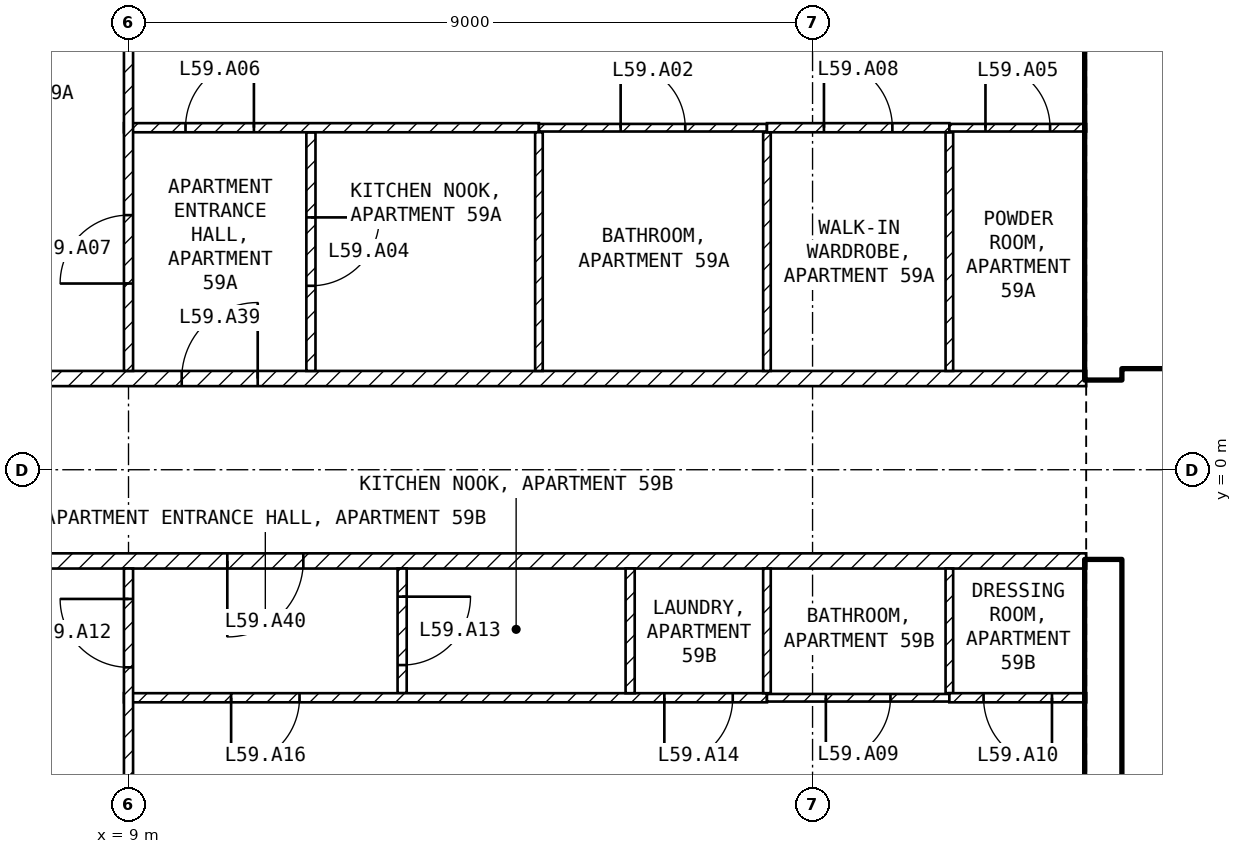
"""IFC4 building model, lengths in metres.
Left out: names, types, materials, properties, quantities, classifications, styles, units other than length and angle.
Written with IfcOpenShell. Run it as: python <this file> out.ifc"""

import sys

from ifc_helpers import new_model, si_unit, direction, frame, frame_2d, origin, place, context, subcontext, project, spatial, rectangle, extrude, element, fill, save


model = new_model("IFC4")
c1 = context("Model", 3, precision=1e-05, world=origin(), true_north=direction((0.0, 1.0)))
c2 = subcontext(c1, "Body", "Model", "MODEL_VIEW")
j1 = project(units=[si_unit("LENGTHUNIT", "METRE"), si_unit("PLANEANGLEUNIT", "RADIAN")], contexts=[c1])
p1 = place(None, origin())
s1 = spatial("IfcSite", under=j1, at=p1, CompositionType="ELEMENT")
p2 = place(p1, origin())
s2 = spatial("IfcBuilding", under=s1, at=p2, CompositionType="ELEMENT")
p3 = place(p2, frame((0.0, 0.0, 236.0)))
s3 = spatial("IfcBuildingStorey", under=s2, at=p3, CompositionType="ELEMENT", Elevation=236.0)
for number, where, z_axis, x_axis in (
    (1, (21.825, -8.1, 0.0), (0.0, 0.0, 1.0), (0.0, 1.0, 0.0)),
    (2, (21.825, 1.2, 0.0), (0.0, 0.0, 1.0), (0.0, 1.0, 0.0)),
):
    element("IfcWall", number, at=place(p3, frame(where, z_axis=z_axis, x_axis=x_axis)), inside=s3, PredefinedType="SHEAR", context=c2, shape_type="SweptSolid", body=[
        extrude(rectangle(XDim=6.9, YDim=0.45, at=frame_2d((3.45, 0.0))), origin(), (0.0, 0.0, 1.0), 3.25),
    ])
p4 = place(p3, frame((22.05, 1.45, 0.0), z_axis=(0.0, 0.0, 1.0), x_axis=(1.0, 0.0, 0.0)))
e3 = element("IfcWall", 3, at=p4, inside=s3, PredefinedType="SOLIDWALL", context=c2, shape_type="SweptSolid", body=[
    extrude(rectangle(XDim=11.3, YDim=0.2, at=frame_2d((5.65, 0.0))), origin(), (0.0, 0.0, 1.0), 3.25),
])
p5 = place(p4, frame((0.75, 0.0, 0.0)))
e4 = element("IfcOpeningElement", 4, at=p5, cuts=e3, PredefinedType="OPENING", context=c2, shape_type="SweptSolid", body=[
    extrude(rectangle(XDim=1.0, YDim=2.1, at=frame_2d((0.5, 1.05))), frame((0.0, 0.11, 0.0), z_axis=(0.0, -1.0, 0.0), x_axis=(1.0, 0.0, 0.0)), (0.0, 0.0, 1.0), 0.22),
])
p6 = place(p4, frame((3.25, 0.0, 0.0)))
e5 = element("IfcOpeningElement", 5, at=p6, cuts=e3, PredefinedType="OPENING", context=c2, shape_type="SweptSolid", body=[
    extrude(rectangle(XDim=1.0, YDim=2.1, at=frame_2d((0.5, 1.05))), frame((0.0, 0.11, 0.0), z_axis=(0.0, -1.0, 0.0), x_axis=(1.0, 0.0, 0.0)), (0.0, 0.0, 1.0), 0.22),
])
p7 = place(p4, frame((9.225, 0.0, 0.0)))
e6 = element("IfcOpeningElement", 6, at=p7, cuts=e3, PredefinedType="OPENING", context=c2, shape_type="SweptSolid", body=[
    extrude(rectangle(XDim=0.9, YDim=2.1, at=frame_2d((0.45, 1.05))), frame((0.0, 0.11, 0.0), z_axis=(0.0, -1.0, 0.0), x_axis=(1.0, 0.0, 0.0)), (0.0, 0.0, 1.0), 0.22),
])
p8 = place(p3, frame((22.05, 5.15, 0.0), z_axis=(0.0, 0.0, 1.0), x_axis=(1.0, 0.0, 0.0)))
e7 = element("IfcWall", 7, at=p8, inside=s3, PredefinedType="SOLIDWALL", context=c2, shape_type="SweptSolid", body=[
    extrude(rectangle(XDim=6.3, YDim=0.2, at=frame_2d((3.15, 0.0))), origin(), (0.0, 0.0, 1.0), 3.25),
])
p9 = place(p8, frame((0.2, 0.0, 0.0)))
e8 = element("IfcOpeningElement", 8, at=p9, cuts=e7, PredefinedType="OPENING", context=c2, shape_type="SweptSolid", body=[
    extrude(rectangle(XDim=1.0, YDim=2.1, at=frame_2d((0.5, 1.05))), frame((0.0, 0.11, 0.0), z_axis=(0.0, -1.0, 0.0), x_axis=(1.0, 0.0, 0.0)), (0.0, 0.0, 1.0), 0.22),
])
p10 = place(p3, frame((4.4, 1.2, 0.0), z_axis=(0.0, 0.0, 1.0), x_axis=(1.0, 0.0, 0.0)))
e9 = element("IfcWall", 9, at=p10, inside=s3, PredefinedType="PARTITIONING", context=c2, shape_type="SweptSolid", body=[
    extrude(rectangle(XDim=17.2, YDim=0.2, at=frame_2d((8.6, 0.0))), origin(), (0.0, 0.0, 1.0), 3.25),
])
p11 = place(p10, frame((5.3, 0.0, 0.0)))
e10 = element("IfcOpeningElement", 10, at=p11, cuts=e9, PredefinedType="OPENING", context=c2, shape_type="SweptSolid", body=[
    extrude(rectangle(XDim=1.0, YDim=2.1, at=frame_2d((0.5, 1.05))), frame((0.0, 0.11, 0.0), z_axis=(0.0, -1.0, 0.0), x_axis=(1.0, 0.0, 0.0)), (0.0, 0.0, 1.0), 0.22),
])
p12 = place(p3, frame((21.6, -1.2, 0.0), z_axis=(0.0, 0.0, 1.0), x_axis=(-1.0, 0.0, 0.0)))
e11 = element("IfcWall", 11, at=p12, inside=s3, PredefinedType="PARTITIONING", context=c2, shape_type="SweptSolid", body=[
    extrude(rectangle(XDim=17.2, YDim=0.2, at=frame_2d((8.6, 0.0))), origin(), (0.0, 0.0, 1.0), 3.25),
])
p13 = place(p12, frame((10.3, 0.0, 0.0)))
e12 = element("IfcOpeningElement", 12, at=p13, cuts=e11, PredefinedType="OPENING", context=c2, shape_type="SweptSolid", body=[
    extrude(rectangle(XDim=1.0, YDim=2.1, at=frame_2d((0.5, 1.05))), frame((0.0, 0.11, 0.0), z_axis=(0.0, -1.0, 0.0), x_axis=(1.0, 0.0, 0.0)), (0.0, 0.0, 1.0), 0.22),
])
p14 = place(p3, frame((11.4, 4.44, 0.0), z_axis=(0.0, 0.0, 1.0), x_axis=(0.0, -1.0, 0.0)))
e13 = element("IfcWall", 13, at=p14, inside=s3, PredefinedType="PARTITIONING", context=c2, shape_type="SweptSolid", body=[
    extrude(rectangle(XDim=3.14, YDim=0.12, at=frame_2d((1.57, 0.0))), origin(), (0.0, 0.0, 1.0), 3.25),
])
p15 = place(p14, frame((1.12, 0.0, 0.0)))
e14 = element("IfcOpeningElement", 14, at=p15, cuts=e13, PredefinedType="OPENING", context=c2, shape_type="SweptSolid", body=[
    extrude(rectangle(XDim=0.9, YDim=2.1, at=frame_2d((0.45, 1.05))), frame((0.0, 0.07, 0.0), z_axis=(0.0, -1.0, 0.0), x_axis=(1.0, 0.0, 0.0)), (0.0, 0.0, 1.0), 0.14),
])
p16 = place(p3, frame((8.94, 4.5, 0.0), z_axis=(0.0, 0.0, 1.0), x_axis=(1.0, 0.0, 0.0)))
e15 = element("IfcWall", 15, at=p16, inside=s3, PredefinedType="PARTITIONING", context=c2, shape_type="SweptSolid", body=[
    extrude(rectangle(XDim=5.46, YDim=0.12, at=frame_2d((2.73, 0.0))), origin(), (0.0, 0.0, 1.0), 3.25),
])
p17 = place(p16, frame((0.81, 0.0, 0.0)))
e16 = element("IfcOpeningElement", 16, at=p17, cuts=e15, PredefinedType="OPENING", context=c2, shape_type="SweptSolid", body=[
    extrude(rectangle(XDim=0.9, YDim=2.1, at=frame_2d((0.45, 1.05))), frame((0.0, 0.07, 0.0), z_axis=(0.0, -1.0, 0.0), x_axis=(1.0, 0.0, 0.0)), (0.0, 0.0, 1.0), 0.14),
])
p18 = place(p3, frame((9.0, 1.3, 0.0), z_axis=(0.0, 0.0, 1.0), x_axis=(0.0, 1.0, 0.0)))
e17 = element("IfcWall", 17, at=p18, inside=s3, PredefinedType="PARTITIONING", context=c2, shape_type="SweptSolid", body=[
    extrude(rectangle(XDim=7.62, YDim=0.12, at=frame_2d((3.81, 0.0))), origin(), (0.0, 0.0, 1.0), 3.25),
])
p19 = place(p18, frame((1.15, 0.0, 0.0)))
e18 = element("IfcOpeningElement", 18, at=p19, cuts=e17, PredefinedType="OPENING", context=c2, shape_type="SweptSolid", body=[
    extrude(rectangle(XDim=0.9, YDim=2.1, at=frame_2d((0.45, 1.05))), frame((0.0, 0.07, 0.0), z_axis=(0.0, -1.0, 0.0), x_axis=(1.0, 0.0, 0.0)), (0.0, 0.0, 1.0), 0.14),
])
for number, where, z_axis, x_axis in (
    (19, (14.4, 4.44, 0.0), (0.0, 0.0, 1.0), (0.0, -1.0, 0.0)),
    (20, (17.4, 4.44, 0.0), (0.0, 0.0, 1.0), (0.0, -1.0, 0.0)),
):
    element("IfcWall", number, at=place(p3, frame(where, z_axis=z_axis, x_axis=x_axis)), inside=s3, PredefinedType="PARTITIONING", context=c2, shape_type="SweptSolid", body=[
        extrude(rectangle(XDim=3.14, YDim=0.1, at=frame_2d((1.57, 0.0))), origin(), (0.0, 0.0, 1.0), 3.25),
    ])
p20 = place(p3, frame((14.4, 4.5, 0.0), z_axis=(0.0, 0.0, 1.0), x_axis=(1.0, 0.0, 0.0)))
e21 = element("IfcWall", 21, at=p20, inside=s3, PredefinedType="PARTITIONING", context=c2, shape_type="SweptSolid", body=[
    extrude(rectangle(XDim=3.0, YDim=0.1, at=frame_2d((1.5, 0.0))), origin(), (0.0, 0.0, 1.0), 3.25),
])
p21 = place(p20, frame((1.075, 0.0, 0.0)))
e22 = element("IfcOpeningElement", 22, at=p21, cuts=e21, PredefinedType="OPENING", context=c2, shape_type="SweptSolid", body=[
    extrude(rectangle(XDim=0.85, YDim=2.1, at=frame_2d((0.425, 1.05))), frame((0.0, 0.06, 0.0), z_axis=(0.0, -1.0, 0.0), x_axis=(1.0, 0.0, 0.0)), (0.0, 0.0, 1.0), 0.12),
])
p22 = place(p3, frame((19.8, 4.44, 0.0), z_axis=(0.0, 0.0, 1.0), x_axis=(0.0, -1.0, 0.0)))
e23 = element("IfcWall", 23, at=p22, inside=s3, PredefinedType="PARTITIONING", context=c2, shape_type="SweptSolid", body=[
    extrude(rectangle(XDim=3.14, YDim=0.1, at=frame_2d((1.57, 0.0))), origin(), (0.0, 0.0, 1.0), 3.25),
])
p23 = place(p3, frame((17.4, 4.5, 0.0), z_axis=(0.0, 0.0, 1.0), x_axis=(1.0, 0.0, 0.0)))
e24 = element("IfcWall", 24, at=p23, inside=s3, PredefinedType="PARTITIONING", context=c2, shape_type="SweptSolid", body=[
    extrude(rectangle(XDim=2.4, YDim=0.12, at=frame_2d((1.2, 0.0))), origin(), (0.0, 0.0, 1.0), 3.25),
])
p24 = place(p23, frame((0.75, 0.0, 0.0)))
e25 = element("IfcOpeningElement", 25, at=p24, cuts=e24, PredefinedType="OPENING", context=c2, shape_type="SweptSolid", body=[
    extrude(rectangle(XDim=0.9, YDim=2.1, at=frame_2d((0.45, 1.05))), frame((0.0, 0.07, 0.0), z_axis=(0.0, -1.0, 0.0), x_axis=(1.0, 0.0, 0.0)), (0.0, 0.0, 1.0), 0.14),
])
p25 = place(p3, frame((19.8, 4.5, 0.0), z_axis=(0.0, 0.0, 1.0), x_axis=(1.0, 0.0, 0.0)))
e26 = element("IfcWall", 26, at=p25, inside=s3, PredefinedType="PARTITIONING", context=c2, shape_type="SweptSolid", body=[
    extrude(rectangle(XDim=1.8, YDim=0.1, at=frame_2d((0.9, 0.0))), origin(), (0.0, 0.0, 1.0), 3.25),
])
p26 = place(p25, frame((0.475, 0.0, 0.0)))
e27 = element("IfcOpeningElement", 27, at=p26, cuts=e26, PredefinedType="OPENING", context=c2, shape_type="SweptSolid", body=[
    extrude(rectangle(XDim=0.85, YDim=2.1, at=frame_2d((0.425, 1.05))), frame((0.0, 0.06, 0.0), z_axis=(0.0, -1.0, 0.0), x_axis=(1.0, 0.0, 0.0)), (0.0, 0.0, 1.0), 0.12),
])
p27 = place(p3, frame((12.6, -1.3, 0.0), z_axis=(0.0, 0.0, 1.0), x_axis=(0.0, -1.0, 0.0)))
e28 = element("IfcWall", 28, at=p27, inside=s3, PredefinedType="PARTITIONING", context=c2, shape_type="SweptSolid", body=[
    extrude(rectangle(XDim=1.64, YDim=0.12, at=frame_2d((0.82, 0.0))), origin(), (0.0, 0.0, 1.0), 3.25),
])
p28 = place(p27, frame((0.37, 0.0, 0.0)))
e29 = element("IfcOpeningElement", 29, at=p28, cuts=e28, PredefinedType="OPENING", context=c2, shape_type="SweptSolid", body=[
    extrude(rectangle(XDim=0.9, YDim=2.1, at=frame_2d((0.45, 1.05))), frame((0.0, 0.07, 0.0), z_axis=(0.0, -1.0, 0.0), x_axis=(1.0, 0.0, 0.0)), (0.0, 0.0, 1.0), 0.14),
])
p29 = place(p3, frame((17.4, -3.0, 0.0), z_axis=(0.0, 0.0, 1.0), x_axis=(-1.0, 0.0, 0.0)))
e30 = element("IfcWall", 30, at=p29, inside=s3, PredefinedType="PARTITIONING", context=c2, shape_type="SweptSolid", body=[
    extrude(rectangle(XDim=8.46, YDim=0.12, at=frame_2d((4.23, 0.0))), origin(), (0.0, 0.0, 1.0), 3.25),
])
p30 = place(p29, frame((0.45, 0.0, 0.0)))
e31 = element("IfcOpeningElement", 31, at=p30, cuts=e30, PredefinedType="OPENING", context=c2, shape_type="SweptSolid", body=[
    extrude(rectangle(XDim=0.9, YDim=2.1, at=frame_2d((0.45, 1.05))), frame((0.0, 0.07, 0.0), z_axis=(0.0, -1.0, 0.0), x_axis=(1.0, 0.0, 0.0)), (0.0, 0.0, 1.0), 0.14),
])
p31 = place(p29, frame((6.15, 0.0, 0.0)))
e32 = element("IfcOpeningElement", 32, at=p31, cuts=e30, PredefinedType="OPENING", context=c2, shape_type="SweptSolid", body=[
    extrude(rectangle(XDim=0.9, YDim=2.1, at=frame_2d((0.45, 1.05))), frame((0.0, 0.07, 0.0), z_axis=(0.0, -1.0, 0.0), x_axis=(1.0, 0.0, 0.0)), (0.0, 0.0, 1.0), 0.14),
])
p32 = place(p3, frame((9.0, -8.92, 0.0), z_axis=(0.0, 0.0, 1.0), x_axis=(0.0, 1.0, 0.0)))
e33 = element("IfcWall", 33, at=p32, inside=s3, PredefinedType="PARTITIONING", context=c2, shape_type="SweptSolid", body=[
    extrude(rectangle(XDim=7.62, YDim=0.12, at=frame_2d((3.81, 0.0))), origin(), (0.0, 0.0, 1.0), 3.25),
])
p33 = place(p32, frame((6.32, 0.0, 0.0)))
e34 = element("IfcOpeningElement", 34, at=p33, cuts=e33, PredefinedType="OPENING", context=c2, shape_type="SweptSolid", body=[
    extrude(rectangle(XDim=0.9, YDim=2.1, at=frame_2d((0.45, 1.05))), frame((0.0, 0.07, 0.0), z_axis=(0.0, -1.0, 0.0), x_axis=(1.0, 0.0, 0.0)), (0.0, 0.0, 1.0), 0.14),
])
p34 = place(p3, frame((15.6, -1.3, 0.0), z_axis=(0.0, 0.0, 1.0), x_axis=(0.0, -1.0, 0.0)))
e35 = element("IfcWall", 35, at=p34, inside=s3, PredefinedType="PARTITIONING", context=c2, shape_type="SweptSolid", body=[
    extrude(rectangle(XDim=1.64, YDim=0.12, at=frame_2d((0.82, 0.0))), origin(), (0.0, 0.0, 1.0), 3.25),
])
for number, where, z_axis, x_axis in (
    (36, (17.4, -1.3, 0.0), (0.0, 0.0, 1.0), (0.0, -1.0, 0.0)),
    (37, (19.8, -1.3, 0.0), (0.0, 0.0, 1.0), (0.0, -1.0, 0.0)),
):
    element("IfcWall", number, at=place(p3, frame(where, z_axis=z_axis, x_axis=x_axis)), inside=s3, PredefinedType="PARTITIONING", context=c2, shape_type="SweptSolid", body=[
        extrude(rectangle(XDim=1.64, YDim=0.1, at=frame_2d((0.82, 0.0))), origin(), (0.0, 0.0, 1.0), 3.25),
    ])
p35 = place(p3, frame((19.8, -3.0, 0.0), z_axis=(0.0, 0.0, 1.0), x_axis=(-1.0, 0.0, 0.0)))
e38 = element("IfcWall", 38, at=p35, inside=s3, PredefinedType="PARTITIONING", context=c2, shape_type="SweptSolid", body=[
    extrude(rectangle(XDim=2.4, YDim=0.1, at=frame_2d((1.2, 0.0))), origin(), (0.0, 0.0, 1.0), 3.25),
])
p36 = place(p35, frame((0.775, 0.0, 0.0)))
e39 = element("IfcOpeningElement", 39, at=p36, cuts=e38, PredefinedType="OPENING", context=c2, shape_type="SweptSolid", body=[
    extrude(rectangle(XDim=0.85, YDim=2.1, at=frame_2d((0.425, 1.05))), frame((0.0, 0.06, 0.0), z_axis=(0.0, -1.0, 0.0), x_axis=(1.0, 0.0, 0.0)), (0.0, 0.0, 1.0), 0.12),
])
p37 = place(p3, frame((21.6, -3.0, 0.0), z_axis=(0.0, 0.0, 1.0), x_axis=(-1.0, 0.0, 0.0)))
e40 = element("IfcWall", 40, at=p37, inside=s3, PredefinedType="PARTITIONING", context=c2, shape_type="SweptSolid", body=[
    extrude(rectangle(XDim=1.8, YDim=0.12, at=frame_2d((0.9, 0.0))), origin(), (0.0, 0.0, 1.0), 3.25),
])
p38 = place(p37, frame((0.45, 0.0, 0.0)))
e41 = element("IfcOpeningElement", 41, at=p38, cuts=e40, PredefinedType="OPENING", context=c2, shape_type="SweptSolid", body=[
    extrude(rectangle(XDim=0.9, YDim=2.1, at=frame_2d((0.45, 1.05))), frame((0.0, 0.07, 0.0), z_axis=(0.0, -1.0, 0.0), x_axis=(1.0, 0.0, 0.0)), (0.0, 0.0, 1.0), 0.14),
])
p39 = place(p9, origin())
e42 = element("IfcDoor", 42, at=p39, inside=s3, OperationType="SINGLE_SWING_LEFT", PredefinedType="DOOR", context=c2, shape_type="SweptSolid", body=[
    extrude(rectangle(XDim=1.0, YDim=2.1, at=frame_2d((0.5, 1.05))), frame((0.0, 0.025, 0.0), z_axis=(0.0, -1.0, 0.0), x_axis=(1.0, 0.0, 0.0)), (0.0, 0.0, 1.0), 0.05),
])
fill(e8, e42)
p40 = place(p21, origin())
e43 = element("IfcDoor", 43, at=p40, inside=s3, OperationType="SINGLE_SWING_LEFT", PredefinedType="DOOR", context=c2, shape_type="SweptSolid", body=[
    extrude(rectangle(XDim=0.85, YDim=2.1, at=frame_2d((0.425, 1.05))), frame((0.0, 0.025, 0.0), z_axis=(0.0, -1.0, 0.0), x_axis=(1.0, 0.0, 0.0)), (0.0, 0.0, 1.0), 0.05),
])
fill(e22, e43)
p41 = place(p15, origin())
e44 = element("IfcDoor", 44, at=p41, inside=s3, OperationType="SINGLE_SWING_LEFT", PredefinedType="DOOR", context=c2, shape_type="SweptSolid", body=[
    extrude(rectangle(XDim=0.9, YDim=2.1, at=frame_2d((0.45, 1.05))), frame((0.0, 0.025, 0.0), z_axis=(0.0, -1.0, 0.0), x_axis=(1.0, 0.0, 0.0)), (0.0, 0.0, 1.0), 0.05),
])
fill(e14, e44)
p42 = place(p26, origin())
e45 = element("IfcDoor", 45, at=p42, inside=s3, OperationType="SINGLE_SWING_LEFT", PredefinedType="DOOR", context=c2, shape_type="SweptSolid", body=[
    extrude(rectangle(XDim=0.85, YDim=2.1, at=frame_2d((0.425, 1.05))), frame((0.0, 0.025, 0.0), z_axis=(0.0, -1.0, 0.0), x_axis=(1.0, 0.0, 0.0)), (0.0, 0.0, 1.0), 0.05),
])
fill(e27, e45)
p43 = place(p17, origin())
e46 = element("IfcDoor", 46, at=p43, inside=s3, OperationType="SINGLE_SWING_RIGHT", PredefinedType="DOOR", context=c2, shape_type="SweptSolid", body=[
    extrude(rectangle(XDim=0.9, YDim=2.1, at=frame_2d((0.45, 1.05))), frame((0.0, 0.025, 0.0), z_axis=(0.0, -1.0, 0.0), x_axis=(1.0, 0.0, 0.0)), (0.0, 0.0, 1.0), 0.05),
])
fill(e16, e46)
p44 = place(p19, origin())
e47 = element("IfcDoor", 47, at=p44, inside=s3, OperationType="SINGLE_SWING_LEFT", PredefinedType="DOOR", context=c2, shape_type="SweptSolid", body=[
    extrude(rectangle(XDim=0.9, YDim=2.1, at=frame_2d((0.45, 1.05))), frame((0.0, 0.025, 0.0), z_axis=(0.0, -1.0, 0.0), x_axis=(1.0, 0.0, 0.0)), (0.0, 0.0, 1.0), 0.05),
])
fill(e18, e47)
p45 = place(p24, origin())
e48 = element("IfcDoor", 48, at=p45, inside=s3, OperationType="SINGLE_SWING_LEFT", PredefinedType="DOOR", context=c2, shape_type="SweptSolid", body=[
    extrude(rectangle(XDim=0.9, YDim=2.1, at=frame_2d((0.45, 1.05))), frame((0.0, 0.025, 0.0), z_axis=(0.0, -1.0, 0.0), x_axis=(1.0, 0.0, 0.0)), (0.0, 0.0, 1.0), 0.05),
])
fill(e25, e48)
p46 = place(p36, origin())
e49 = element("IfcDoor", 49, at=p46, inside=s3, OperationType="SINGLE_SWING_RIGHT", PredefinedType="DOOR", context=c2, shape_type="SweptSolid", body=[
    extrude(rectangle(XDim=0.85, YDim=2.1, at=frame_2d((0.425, 1.05))), frame((0.0, 0.025, 0.0), z_axis=(0.0, -1.0, 0.0), x_axis=(1.0, 0.0, 0.0)), (0.0, 0.0, 1.0), 0.05),
])
fill(e39, e49)
p47 = place(p38, origin())
e50 = element("IfcDoor", 50, at=p47, inside=s3, OperationType="SINGLE_SWING_LEFT", PredefinedType="DOOR", context=c2, shape_type="SweptSolid", body=[
    extrude(rectangle(XDim=0.9, YDim=2.1, at=frame_2d((0.45, 1.05))), frame((0.0, 0.025, 0.0), z_axis=(0.0, -1.0, 0.0), x_axis=(1.0, 0.0, 0.0)), (0.0, 0.0, 1.0), 0.05),
])
fill(e41, e50)
p48 = place(p33, origin())
e51 = element("IfcDoor", 51, at=p48, inside=s3, OperationType="SINGLE_SWING_RIGHT", PredefinedType="DOOR", context=c2, shape_type="SweptSolid", body=[
    extrude(rectangle(XDim=0.9, YDim=2.1, at=frame_2d((0.45, 1.05))), frame((0.0, 0.025, 0.0), z_axis=(0.0, -1.0, 0.0), x_axis=(1.0, 0.0, 0.0)), (0.0, 0.0, 1.0), 0.05),
])
fill(e34, e51)
p49 = place(p28, origin())
e52 = element("IfcDoor", 52, at=p49, inside=s3, OperationType="SINGLE_SWING_LEFT", PredefinedType="DOOR", context=c2, shape_type="SweptSolid", body=[
    extrude(rectangle(XDim=0.9, YDim=2.1, at=frame_2d((0.45, 1.05))), frame((0.0, 0.025, 0.0), z_axis=(0.0, -1.0, 0.0), x_axis=(1.0, 0.0, 0.0)), (0.0, 0.0, 1.0), 0.05),
])
fill(e29, e52)
p50 = place(p30, origin())
e53 = element("IfcDoor", 53, at=p50, inside=s3, OperationType="SINGLE_SWING_RIGHT", PredefinedType="DOOR", context=c2, shape_type="SweptSolid", body=[
    extrude(rectangle(XDim=0.9, YDim=2.1, at=frame_2d((0.45, 1.05))), frame((0.0, 0.025, 0.0), z_axis=(0.0, -1.0, 0.0), x_axis=(1.0, 0.0, 0.0)), (0.0, 0.0, 1.0), 0.05),
])
fill(e31, e53)
p51 = place(p31, origin())
e54 = element("IfcDoor", 54, at=p51, inside=s3, OperationType="SINGLE_SWING_RIGHT", PredefinedType="DOOR", context=c2, shape_type="SweptSolid", body=[
    extrude(rectangle(XDim=0.9, YDim=2.1, at=frame_2d((0.45, 1.05))), frame((0.0, 0.025, 0.0), z_axis=(0.0, -1.0, 0.0), x_axis=(1.0, 0.0, 0.0)), (0.0, 0.0, 1.0), 0.05),
])
fill(e32, e54)
p52 = place(p11, origin())
e55 = element("IfcDoor", 55, at=p52, inside=s3, OperationType="SINGLE_SWING_RIGHT", PredefinedType="DOOR", context=c2, shape_type="SweptSolid", body=[
    extrude(rectangle(XDim=1.0, YDim=2.1, at=frame_2d((0.5, 1.05))), frame((0.0, 0.025, 0.0), z_axis=(0.0, -1.0, 0.0), x_axis=(1.0, 0.0, 0.0)), (0.0, 0.0, 1.0), 0.05),
])
fill(e10, e55)
p53 = place(p13, origin())
e56 = element("IfcDoor", 56, at=p53, inside=s3, OperationType="SINGLE_SWING_RIGHT", PredefinedType="DOOR", context=c2, shape_type="SweptSolid", body=[
    extrude(rectangle(XDim=1.0, YDim=2.1, at=frame_2d((0.5, 1.05))), frame((0.0, 0.025, 0.0), z_axis=(0.0, -1.0, 0.0), x_axis=(1.0, 0.0, 0.0)), (0.0, 0.0, 1.0), 0.05),
])
fill(e12, e56)
save(model, sys.argv[1])
